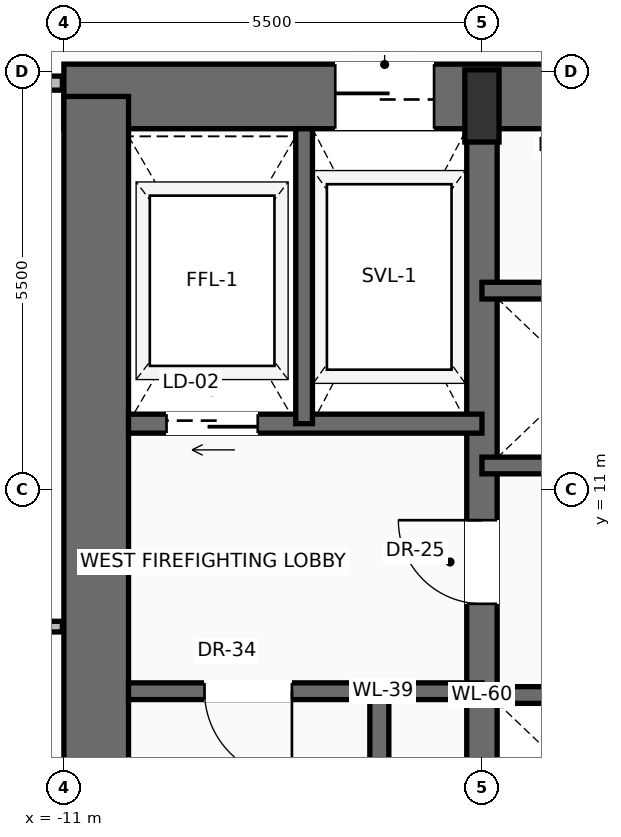
"""IFC4 building model, lengths in metres.
Left out: names, types, materials, properties, quantities, classifications, styles, units other than length and angle.
Written with IfcOpenShell. Run it as: python <this file> out.ifc"""

import sys

from ifc_helpers import new_model, si_unit, direction, frame, frame_2d, origin, origin_2d, place, context, subcontext, project, spatial, rectangle, extrude, source, transform, mapped, element, fill, save


model = new_model("IFC4")
c1 = context("Model", 3, precision=1e-05, world=origin(), true_north=direction((0.0, 1.0)))
c2 = subcontext(c1, "Body", "Model", "MODEL_VIEW")
j1 = project(units=[si_unit("LENGTHUNIT", "METRE"), si_unit("PLANEANGLEUNIT", "RADIAN")], contexts=[c1])
p1 = place(None, origin())
s1 = spatial("IfcSite", under=j1, at=p1, CompositionType="ELEMENT")
p2 = place(p1, origin())
s2 = spatial("IfcBuilding", under=s1, at=p2, CompositionType="ELEMENT")
p3 = place(p2, frame((0.0, 0.0, 60.8)))
s3 = spatial("IfcBuildingStorey", under=s2, at=p3, CompositionType="ELEMENT", Elevation=60.8)
p4 = place(p3, frame((-11.0, 16.175, 0.0), z_axis=(0.0, 0.0, 1.0), x_axis=(1.0, 0.0, 0.0)))
e1 = element("IfcWall", 1, at=p4, inside=s3, PredefinedType="SHEAR", context=c2, shape_type="SweptSolid", body=[
    extrude(rectangle(XDim=22.0, YDim=0.85, at=frame_2d((11.0, 0.0))), origin(), (0.0, 0.0, 1.0), 3.45),
])
p5 = place(p4, frame((3.57, 0.0, 0.0)))
e2 = element("IfcOpeningElement", 2, at=p5, cuts=e1, PredefinedType="OPENING", context=c2, shape_type="SweptSolid", body=[
    extrude(rectangle(XDim=1.3, YDim=2.3, at=frame_2d((0.65, 1.15))), frame((0.0, 0.435, 0.0), z_axis=(0.0, -1.0, 0.0), x_axis=(1.0, 0.0, 0.0)), (0.0, 0.0, 1.0), 0.87),
])
p6 = place(p4, frame((10.0, 0.0, 0.0)))
e3 = element("IfcOpeningElement", 3, at=p6, cuts=e1, PredefinedType="OPENING", context=c2, shape_type="SweptSolid", body=[
    extrude(rectangle(XDim=2.0, YDim=2.4, at=frame_2d((1.0, 1.2))), frame((0.0, 0.435, 0.0), z_axis=(0.0, -1.0, 0.0), x_axis=(1.0, 0.0, 0.0)), (0.0, 0.0, 1.0), 0.87),
])
p7 = place(p3, frame((-10.575, 0.425, 0.0), z_axis=(0.0, 0.0, 1.0), x_axis=(0.0, 1.0, 0.0)))
e4 = element("IfcWall", 4, at=p7, inside=s3, PredefinedType="SHEAR", context=c2, shape_type="SweptSolid", body=[
    extrude(rectangle(XDim=15.75, YDim=0.85, at=frame_2d((7.875, 0.0))), origin(), (0.0, 0.0, 1.0), 3.45),
])
p8 = place(p3, frame((-5.5, 0.425, 0.0), z_axis=(0.0, 0.0, 1.0), x_axis=(0.0, 1.0, 0.0)))
e5 = element("IfcWall", 5, at=p8, inside=s3, PredefinedType="SHEAR", context=c2, shape_type="SweptSolid", body=[
    extrude(rectangle(XDim=15.75, YDim=0.4, at=frame_2d((7.875, 0.0))), origin(), (0.0, 0.0, 1.0), 3.45),
])
p9 = place(p8, frame((9.075, 0.0, 0.0)))
e6 = element("IfcOpeningElement", 6, at=p9, cuts=e5, PredefinedType="OPENING", context=c2, shape_type="SweptSolid", body=[
    extrude(rectangle(XDim=1.1, YDim=2.2, at=frame_2d((0.55, 1.1))), frame((0.0, 0.21, 0.0), z_axis=(0.0, -1.0, 0.0), x_axis=(1.0, 0.0, 0.0)), (0.0, 0.0, 1.0), 0.42),
])
m1 = source(origin(), c2, "Body", "SweptSolid", [
    extrude(rectangle(XDim=0.45, YDim=0.95, at=origin_2d()), origin(), (0.0, 0.0, 1.0), 3.7),
])
p10 = place(p3, frame((-5.5, 16.05, 0.0), z_axis=(0.0, 0.0, 1.0), x_axis=(1.0, 0.0, 0.0)))
e7 = element("IfcColumn", 7, at=p10, inside=s3, PredefinedType="PILASTER", context=c2, shape_type="MappedRepresentation", body=[
    mapped(m1, transform((0.0, 0.0, 0.0), scale=1.0)),
])
p11 = place(p3, frame((-6.85, 0.85, 0.0), z_axis=(0.0, 0.0, 1.0), x_axis=(0.0, 1.0, 0.0)))
e8 = element("IfcWall", 8, at=p11, inside=s3, PredefinedType="SOLIDWALL", context=c2, shape_type="SweptSolid", body=[
    extrude(rectangle(XDim=7.5, YDim=0.25, at=frame_2d((3.75, 0.0))), origin(), (0.0, 0.0, 1.0), 3.45),
])
p12 = place(p3, frame((-5.5, 8.35, 0.0), z_axis=(0.0, 0.0, 1.0), x_axis=(-1.0, 0.0, 0.0)))
e9 = element("IfcWall", 9, at=p12, inside=s3, PredefinedType="SOLIDWALL", context=c2, shape_type="SweptSolid", body=[
    extrude(rectangle(XDim=4.65, YDim=0.22, at=frame_2d((2.325, 0.0))), origin(), (0.0, 0.0, 1.0), 3.45),
])
p13 = place(p12, frame((2.5, 0.0, 0.0)))
e10 = element("IfcOpeningElement", 10, at=p13, cuts=e9, PredefinedType="OPENING", context=c2, shape_type="SweptSolid", body=[
    extrude(rectangle(XDim=1.15, YDim=2.2, at=frame_2d((0.575, 1.1))), frame((0.0, 0.12, 0.0), z_axis=(0.0, -1.0, 0.0), x_axis=(1.0, 0.0, 0.0)), (0.0, 0.0, 1.0), 0.24),
])
p14 = place(p3, frame((-5.5, 11.87, 0.0), z_axis=(0.0, 0.0, 1.0), x_axis=(-1.0, 0.0, 0.0)))
e11 = element("IfcWall", 11, at=p14, inside=s3, PredefinedType="SOLIDWALL", context=c2, shape_type="SweptSolid", body=[
    extrude(rectangle(XDim=4.65, YDim=0.25, at=frame_2d((2.325, 0.0))), origin(), (0.0, 0.0, 1.0), 3.45),
])
p15 = place(p14, frame((2.95, 0.0, 0.0)))
e12 = element("IfcOpeningElement", 12, at=p15, cuts=e11, PredefinedType="OPENING", context=c2, shape_type="SweptSolid", body=[
    extrude(rectangle(XDim=1.2, YDim=2.25, at=frame_2d((0.6, 1.125))), frame((0.0, 0.135, 0.0), z_axis=(0.0, -1.0, 0.0), x_axis=(1.0, 0.0, 0.0)), (0.0, 0.0, 1.0), 0.27),
])
p16 = place(p3, frame((-7.84, 11.87, 0.0), z_axis=(0.0, 0.0, 1.0), x_axis=(0.0, 1.0, 0.0)))
e13 = element("IfcWall", 13, at=p16, inside=s3, PredefinedType="SOLIDWALL", context=c2, shape_type="SweptSolid", body=[
    extrude(rectangle(XDim=3.88, YDim=0.22, at=frame_2d((1.94, 0.0))), origin(), (0.0, 0.0, 1.0), 3.45),
])
for number, where, z_axis, x_axis in (
    (14, (-5.5, 8.3, 0.0), (0.0, 0.0, 1.0), (1.0, 0.0, 0.0)),
    (15, (-5.5, 11.32, 0.0), (0.0, 0.0, 1.0), (1.0, 0.0, 0.0)),
    (16, (-5.5, 13.62, 0.0), (0.0, 0.0, 1.0), (1.0, 0.0, 0.0)),
):
    element("IfcWall", number, at=place(p3, frame(where, z_axis=z_axis, x_axis=x_axis)), inside=s3, PredefinedType="SOLIDWALL", context=c2, shape_type="SweptSolid", body=[
        extrude(rectangle(XDim=7.32, YDim=0.22, at=frame_2d((3.66, 0.0))), origin(), (0.0, 0.0, 1.0), 3.45),
    ])
p17 = place(p3, frame((-24.138, 16.35, 0.0), z_axis=(0.0, 0.0, 1.0), x_axis=(1.0, 0.0, 0.0)))
e17 = element("IfcWall", 17, at=p17, inside=s3, PredefinedType="PARTITIONING", context=c2, shape_type="SweptSolid", body=[
    extrude(rectangle(XDim=13.118, YDim=0.185, at=frame_2d((6.559, 0.0))), origin(), (0.0, 0.0, 1.0), 2.747),
])
p18 = place(p17, frame((5.462, 0.0, 0.0)))
e18 = element("IfcOpeningElement", 18, at=p18, cuts=e17, PredefinedType="OPENING", context=c2, shape_type="SweptSolid", body=[
    extrude(rectangle(XDim=0.95, YDim=2.2, at=frame_2d((0.475, 1.1))), frame((0.0, 0.103, 0.0), z_axis=(0.0, -1.0, 0.0), x_axis=(1.0, 0.0, 0.0)), (0.0, 0.0, 1.0), 0.205),
])
p19 = place(p3, frame((-27.795, 9.2, 0.0), z_axis=(0.0, 0.0, 1.0), x_axis=(1.0, 0.0, 0.0)))
e19 = element("IfcWall", 19, at=p19, inside=s3, PredefinedType="PARTITIONING", context=c2, shape_type="SweptSolid", body=[
    extrude(rectangle(XDim=16.775, YDim=0.14, at=frame_2d((8.387, 0.0))), origin(), (0.0, 0.0, 1.0), 3.442),
])
p20 = place(p19, frame((7.923, 0.0, 0.0)))
e20 = element("IfcOpeningElement", 20, at=p20, cuts=e19, PredefinedType="OPENING", context=c2, shape_type="SweptSolid", body=[
    extrude(rectangle(XDim=0.95, YDim=2.2, at=frame_2d((0.475, 1.1))), frame((0.0, 0.08, 0.0), z_axis=(0.0, -1.0, 0.0), x_axis=(1.0, 0.0, 0.0)), (0.0, 0.0, 1.0), 0.16),
])
m2 = source(origin(), c2, "Body", "SweptSolid", [
    extrude(rectangle(XDim=1.15, YDim=2.2, at=frame_2d((0.575, 1.1))), frame((0.0, 0.025, 0.0), z_axis=(0.0, -1.0, 0.0), x_axis=(1.0, 0.0, 0.0)), (0.0, 0.0, 1.0), 0.05),
])
p21 = place(p13, origin())
e21 = element("IfcDoor", 21, at=p21, inside=s3, OperationType="SINGLE_SWING_LEFT", PredefinedType="DOOR", context=c2, shape_type="MappedRepresentation", body=[
    mapped(m2, transform((0.0, 0.0, 0.0), scale=1.0)),
])
fill(e10, e21)
m3 = source(origin(), c2, "Body", "SweptSolid", [
    extrude(rectangle(XDim=1.1, YDim=2.2, at=frame_2d((0.55, 1.1))), frame((0.0, 0.025, 0.0), z_axis=(0.0, -1.0, 0.0), x_axis=(1.0, 0.0, 0.0)), (0.0, 0.0, 1.0), 0.05),
])
p22 = place(p9, origin())
e22 = element("IfcDoor", 22, at=p22, inside=s3, OperationType="SINGLE_SWING_RIGHT", PredefinedType="DOOR", context=c2, shape_type="MappedRepresentation", body=[
    mapped(m3, transform((0.0, 0.0, 0.0), scale=1.0)),
])
fill(e6, e22)
m4 = source(origin(), c2, "Body", "SweptSolid", [
    extrude(rectangle(XDim=1.2, YDim=2.25, at=frame_2d((0.6, 1.125))), frame((0.0, 0.025, 0.0), z_axis=(0.0, -1.0, 0.0), x_axis=(1.0, 0.0, 0.0)), (0.0, 0.0, 1.0), 0.05),
])
p23 = place(p15, origin())
e23 = element("IfcDoor", 23, at=p23, inside=s3, OperationType="SLIDING_TO_LEFT", PredefinedType="DOOR", context=c2, shape_type="MappedRepresentation", body=[
    mapped(m4, transform((0.0, 0.0, 0.0), scale=1.0)),
])
fill(e12, e23)
m5 = source(origin(), c2, "Body", "SweptSolid", [
    extrude(rectangle(XDim=1.3, YDim=2.3, at=frame_2d((0.65, 1.15))), frame((0.0, 0.025, 0.0), z_axis=(0.0, -1.0, 0.0), x_axis=(1.0, 0.0, 0.0)), (0.0, 0.0, 1.0), 0.05),
])
p24 = place(p5, origin())
e24 = element("IfcDoor", 24, at=p24, inside=s3, OperationType="SLIDING_TO_RIGHT", PredefinedType="DOOR", context=c2, shape_type="MappedRepresentation", body=[
    mapped(m5, transform((0.0, 0.0, 0.0), scale=1.0)),
])
fill(e2, e24)
save(model, sys.argv[1])
